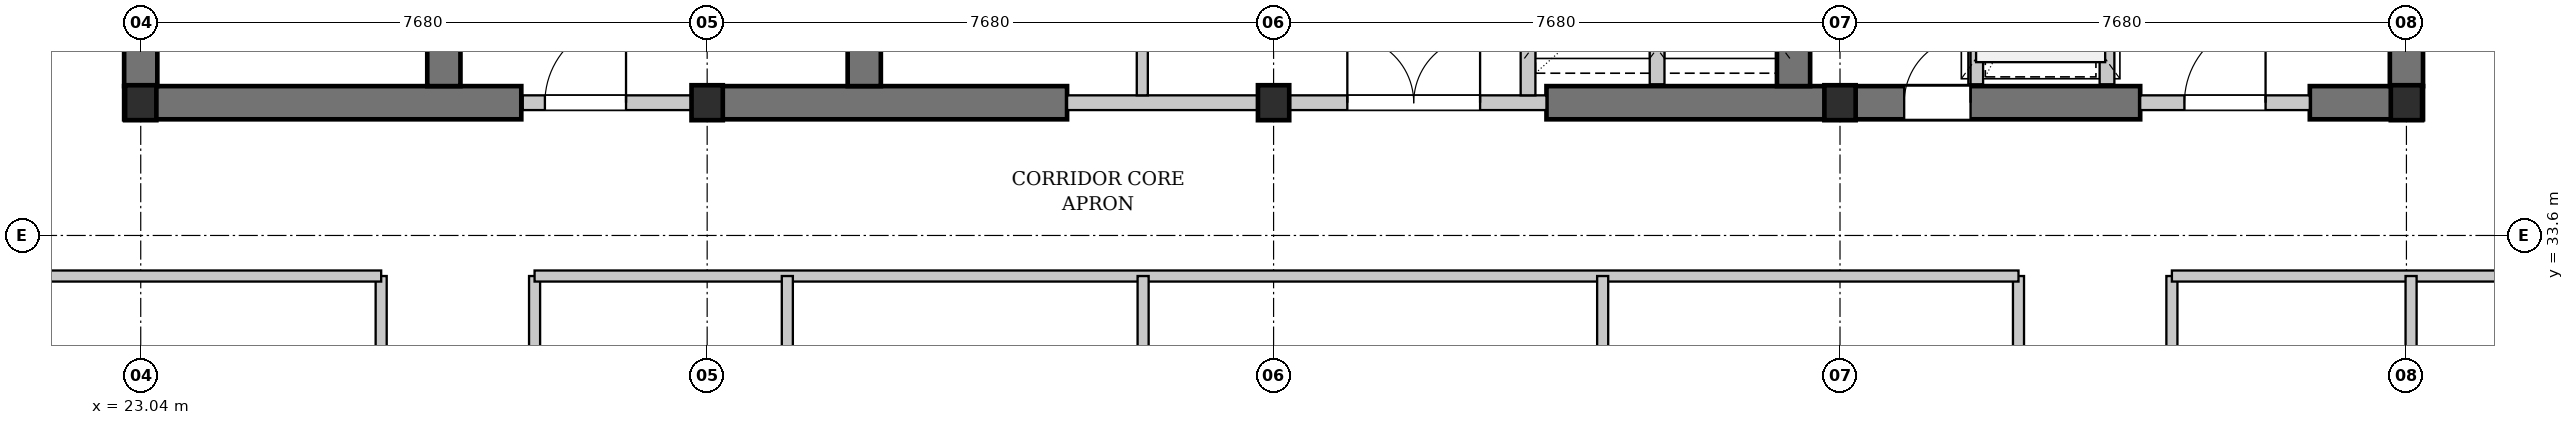
"""IFC4 building model, lengths in metres.
Left out: names, types, materials, properties, quantities, classifications, styles, units other than length and angle.
Written with IfcOpenShell. Run it as: python <this file> out.ifc"""

import sys

from ifc_helpers import new_model, si_unit, direction, frame, frame_2d, origin, origin_2d, place, context, subcontext, project, spatial, rectangle, i_section, extrude, element, fill, save


model = new_model("IFC4")
c1 = context("Model", 3, precision=1e-05, world=origin(), true_north=direction((0.0, 1.0)))
c2 = subcontext(c1, "Body", "Model", "MODEL_VIEW")
j1 = project(units=[si_unit("LENGTHUNIT", "METRE"), si_unit("PLANEANGLEUNIT", "RADIAN")], contexts=[c1])
p1 = place(None, origin())
s1 = spatial("IfcSite", under=j1, at=p1, CompositionType="ELEMENT")
p2 = place(p1, origin())
s2 = spatial("IfcBuilding", under=s1, at=p2, CompositionType="ELEMENT")
p3 = place(p2, frame((0.0, 0.0, 106.7)))
s3 = spatial("IfcBuildingStorey", under=s2, at=p3, CompositionType="ELEMENT", Elevation=106.7)
p4 = place(p3, frame((22.815, 35.4, 0.0), z_axis=(0.0, 0.0, 1.0), x_axis=(1.0, 0.0, 0.0)))
e1 = element("IfcWall", 1, at=p4, inside=s3, PredefinedType="SHEAR", context=c2, shape_type="SweptSolid", body=[
    extrude(rectangle(XDim=5.385, YDim=0.45, at=frame_2d((2.692, 0.0))), origin(), (0.0, 0.0, 1.0), 3.18),
])
p5 = place(p3, frame((30.72, 35.4, 0.0), z_axis=(0.0, 0.0, 1.0), x_axis=(1.0, 0.0, 0.0)))
e2 = element("IfcWall", 2, at=p5, inside=s3, PredefinedType="SHEAR", context=c2, shape_type="SweptSolid", body=[
    extrude(rectangle(XDim=4.88, YDim=0.45, at=frame_2d((2.44, 0.0))), origin(), (0.0, 0.0, 1.0), 3.18),
])
p6 = place(p3, frame((42.1, 35.4, 0.0), z_axis=(0.0, 0.0, 1.0), x_axis=(1.0, 0.0, 0.0)))
e3 = element("IfcWall", 3, at=p6, inside=s3, PredefinedType="SHEAR", context=c2, shape_type="SweptSolid", body=[
    extrude(rectangle(XDim=8.05, YDim=0.45, at=frame_2d((4.025, 0.0))), origin(), (0.0, 0.0, 1.0), 3.18),
])
p7 = place(p6, frame((4.85, 0.0, 0.0)))
e4 = element("IfcOpeningElement", 4, at=p7, cuts=e3, PredefinedType="OPENING", context=c2, shape_type="SweptSolid", body=[
    extrude(rectangle(XDim=0.9, YDim=2.15, at=frame_2d((0.45, 1.075))), frame((0.0, 0.235, 0.0), z_axis=(0.0, -1.0, 0.0), x_axis=(1.0, 0.0, 0.0)), (0.0, 0.0, 1.0), 0.47),
])
p8 = place(p3, frame((52.45, 35.4, 0.0), z_axis=(0.0, 0.0, 1.0), x_axis=(1.0, 0.0, 0.0)))
e5 = element("IfcWall", 5, at=p8, inside=s3, PredefinedType="SHEAR", context=c2, shape_type="SweptSolid", body=[
    extrude(rectangle(XDim=1.535, YDim=0.45, at=frame_2d((0.768, 0.0))), origin(), (0.0, 0.0, 1.0), 3.18),
])
p9 = place(p3, frame((23.04, 35.625, 0.0), z_axis=(0.0, 0.0, 1.0), x_axis=(0.0, 1.0, 0.0)))
e6 = element("IfcWall", 6, at=p9, inside=s3, PredefinedType="SHEAR", context=c2, shape_type="SweptSolid", body=[
    extrude(rectangle(XDim=10.35, YDim=0.45, at=frame_2d((5.175, 0.0))), origin(), (0.0, 0.0, 1.0), 3.18),
])
p10 = place(p3, frame((27.15, 35.625, 0.0), z_axis=(0.0, 0.0, 1.0), x_axis=(0.0, 1.0, 0.0)))
e7 = element("IfcWall", 7, at=p10, inside=s3, PredefinedType="SHEAR", context=c2, shape_type="SweptSolid", body=[
    extrude(rectangle(XDim=10.35, YDim=0.45, at=frame_2d((5.175, 0.0))), origin(), (0.0, 0.0, 1.0), 3.18),
])
p11 = place(p10, frame((0.675, 0.0, 0.0)))
e8 = element("IfcOpeningElement", 8, at=p11, cuts=e7, PredefinedType="OPENING", context=c2, shape_type="SweptSolid", body=[
    extrude(rectangle(XDim=1.1, YDim=2.15, at=frame_2d((0.55, 1.075))), frame((0.0, 0.235, 0.0), z_axis=(0.0, -1.0, 0.0), x_axis=(1.0, 0.0, 0.0)), (0.0, 0.0, 1.0), 0.47),
])
for number, where, z_axis, x_axis in (
    (9, (32.85, 35.625, 0.0), (0.0, 0.0, 1.0), (0.0, 1.0, 0.0)),
    (10, (45.45, 35.625, 0.0), (0.0, 0.0, 1.0), (0.0, 1.0, 0.0)),
    (11, (53.76, 35.625, 0.0), (0.0, 0.0, 1.0), (0.0, 1.0, 0.0)),
):
    element("IfcWall", number, at=place(p3, frame(where, z_axis=z_axis, x_axis=x_axis)), inside=s3, PredefinedType="SHEAR", context=c2, shape_type="SweptSolid", body=[
        extrude(rectangle(XDim=10.35, YDim=0.45, at=frame_2d((5.175, 0.0))), origin(), (0.0, 0.0, 1.0), 3.18),
    ])
for number, where, z_axis, x_axis in (
    (12, (23.04, 35.4, 0.0), (0.0, 0.0, 1.0), (1.0, 0.0, 0.0)),
    (13, (30.72, 35.4, 0.0), (0.0, 0.0, 1.0), (1.0, 0.0, 0.0)),
    (14, (38.4, 35.4, 0.0), (0.0, 0.0, 1.0), (1.0, 0.0, 0.0)),
    (15, (46.08, 35.4, 0.0), (0.0, 0.0, 1.0), (1.0, 0.0, 0.0)),
    (16, (53.76, 35.4, 0.0), (0.0, 0.0, 1.0), (1.0, 0.0, 0.0)),
):
    element("IfcColumn", number, at=place(p3, frame(where, z_axis=z_axis, x_axis=x_axis)), inside=s3, PredefinedType="COLUMN", context=c2, shape_type="SweptSolid", body=[
        extrude(i_section(OverallWidth=0.424, OverallDepth=0.474, WebThickness=0.047, FlangeThickness=0.077, FilletRadius=0.015, at=origin_2d()), origin(), (0.0, 0.0, 1.0), 3.4),
    ])
p12 = place(p3, frame((28.22, 35.4, 0.0), z_axis=(0.0, 0.0, 1.0), x_axis=(1.0, 0.0, 0.0)))
e17 = element("IfcWall", 17, at=p12, inside=s3, PredefinedType="PARTITIONING", context=c2, shape_type="SweptSolid", body=[
    extrude(rectangle(XDim=2.5, YDim=0.2, at=frame_2d((1.25, 0.0))), origin(), (0.0, 0.0, 1.0), 2.525),
])
p13 = place(p12, frame((0.3, 0.0, 0.0)))
e18 = element("IfcOpeningElement", 18, at=p13, cuts=e17, PredefinedType="OPENING", context=c2, shape_type="SweptSolid", body=[
    extrude(rectangle(XDim=1.1, YDim=2.15, at=frame_2d((0.55, 1.075))), frame((0.0, 0.11, 0.0), z_axis=(0.0, -1.0, 0.0), x_axis=(1.0, 0.0, 0.0)), (0.0, 0.0, 1.0), 0.22),
])
p14 = place(p3, frame((35.6, 35.4, 0.0), z_axis=(0.0, 0.0, 1.0), x_axis=(1.0, 0.0, 0.0)))
e19 = element("IfcWall", 19, at=p14, inside=s3, PredefinedType="PARTITIONING", context=c2, shape_type="SweptSolid", body=[
    extrude(rectangle(XDim=6.5, YDim=0.2, at=frame_2d((3.25, 0.0))), origin(), (0.0, 0.0, 1.0), 2.525),
])
p15 = place(p14, frame((3.8, 0.0, 0.0)))
e20 = element("IfcOpeningElement", 20, at=p15, cuts=e19, PredefinedType="OPENING", context=c2, shape_type="SweptSolid", body=[
    extrude(rectangle(XDim=1.8, YDim=2.3, at=frame_2d((0.9, 1.15))), frame((0.0, 0.11, 0.0), z_axis=(0.0, -1.0, 0.0), x_axis=(1.0, 0.0, 0.0)), (0.0, 0.0, 1.0), 0.22),
])
p16 = place(p3, frame((36.62, 35.5, 0.0), z_axis=(0.0, 0.0, 1.0), x_axis=(0.0, 1.0, 0.0)))
e21 = element("IfcWall", 21, at=p16, inside=s3, PredefinedType="PARTITIONING", context=c2, shape_type="SweptSolid", body=[
    extrude(rectangle(XDim=10.42, YDim=0.15, at=frame_2d((5.21, 0.0))), origin(), (0.0, 0.0, 1.0), 3.18),
])
p17 = place(p16, frame((3.92, 0.0, 0.0)))
e22 = element("IfcOpeningElement", 22, at=p17, cuts=e21, PredefinedType="OPENING", context=c2, shape_type="SweptSolid", body=[
    extrude(rectangle(XDim=0.9, YDim=2.15, at=frame_2d((0.45, 1.075))), frame((0.0, 0.085, 0.0), z_axis=(0.0, -1.0, 0.0), x_axis=(1.0, 0.0, 0.0)), (0.0, 0.0, 1.0), 0.17),
])
p18 = place(p16, frame((5.85, 0.0, 0.0)))
e23 = element("IfcOpeningElement", 23, at=p18, cuts=e21, PredefinedType="OPENING", context=c2, shape_type="SweptSolid", body=[
    extrude(rectangle(XDim=0.9, YDim=2.15, at=frame_2d((0.45, 1.075))), frame((0.0, 0.085, 0.0), z_axis=(0.0, -1.0, 0.0), x_axis=(1.0, 0.0, 0.0)), (0.0, 0.0, 1.0), 0.17),
])
p19 = place(p3, frame((43.6, 35.65, 0.0), z_axis=(0.0, 0.0, 1.0), x_axis=(0.0, 1.0, 0.0)))
e24 = element("IfcWall", 24, at=p19, inside=s3, PredefinedType="PARTITIONING", context=c2, shape_type="SweptSolid", body=[
    extrude(rectangle(XDim=3.25, YDim=0.2, at=frame_2d((1.625, 0.0))), origin(), (0.0, 0.0, 1.0), 3.18),
])
p20 = place(p3, frame((41.85, 35.5, 0.0), z_axis=(0.0, 0.0, 1.0), x_axis=(0.0, 1.0, 0.0)))
e25 = element("IfcWall", 25, at=p20, inside=s3, PredefinedType="PARTITIONING", context=c2, shape_type="SweptSolid", body=[
    extrude(rectangle(XDim=3.4, YDim=0.2, at=frame_2d((1.7, 0.0))), origin(), (0.0, 0.0, 1.0), 3.18),
])
p21 = place(p3, frame((50.15, 35.4, 0.0), z_axis=(0.0, 0.0, 1.0), x_axis=(1.0, 0.0, 0.0)))
e26 = element("IfcWall", 26, at=p21, inside=s3, PredefinedType="PARTITIONING", context=c2, shape_type="SweptSolid", body=[
    extrude(rectangle(XDim=2.3, YDim=0.2, at=frame_2d((1.15, 0.0))), origin(), (0.0, 0.0, 1.0), 2.525),
])
p22 = place(p21, frame((0.6, 0.0, 0.0)))
e27 = element("IfcOpeningElement", 27, at=p22, cuts=e26, PredefinedType="OPENING", context=c2, shape_type="SweptSolid", body=[
    extrude(rectangle(XDim=1.1, YDim=2.15, at=frame_2d((0.55, 1.075))), frame((0.0, 0.11, 0.0), z_axis=(0.0, -1.0, 0.0), x_axis=(1.0, 0.0, 0.0)), (0.0, 0.0, 1.0), 0.22),
])
p23 = place(p3, frame((49.7, 35.65, 0.0), z_axis=(0.0, 0.0, 1.0), x_axis=(0.0, 1.0, 0.0)))
e28 = element("IfcWall", 28, at=p23, inside=s3, PredefinedType="PARTITIONING", context=c2, shape_type="SweptSolid", body=[
    extrude(rectangle(XDim=3.15, YDim=0.2, at=frame_2d((1.575, 0.0))), origin(), (0.0, 0.0, 1.0), 3.18),
])
p24 = place(p23, frame((0.85, 0.0, 0.0)))
e29 = element("IfcOpeningElement", 29, at=p24, cuts=e28, PredefinedType="OPENING", context=c2, shape_type="SweptSolid", body=[
    extrude(rectangle(XDim=1.2, YDim=2.2, at=frame_2d((0.6, 1.1))), frame((0.0, 0.11, 0.0), z_axis=(0.0, -1.0, 0.0), x_axis=(1.0, 0.0, 0.0)), (0.0, 0.0, 1.0), 0.22),
])
p25 = place(p3, frame((47.92, 35.65, 0.0), z_axis=(0.0, 0.0, 1.0), x_axis=(0.0, 1.0, 0.0)))
e30 = element("IfcWall", 30, at=p25, inside=s3, PredefinedType="PARTITIONING", context=c2, shape_type="SweptSolid", body=[
    extrude(rectangle(XDim=3.15, YDim=0.2, at=frame_2d((1.575, 0.0))), origin(), (0.0, 0.0, 1.0), 3.18),
])
for number, where, z_axis, x_axis in (
    (31, (26.3, 28.83, 0.0), (0.0, 0.0, 1.0), (0.0, 1.0, 0.0)),
    (32, (28.38, 28.83, 0.0), (0.0, 0.0, 1.0), (0.0, 1.0, 0.0)),
    (33, (48.5, 28.83, 0.0), (0.0, 0.0, 1.0), (0.0, 1.0, 0.0)),
    (34, (50.58, 28.83, 0.0), (0.0, 0.0, 1.0), (0.0, 1.0, 0.0)),
):
    element("IfcWall", number, at=place(p3, frame(where, z_axis=z_axis, x_axis=x_axis)), inside=s3, PredefinedType="PARTITIONING", context=c2, shape_type="SweptSolid", body=[
        extrude(rectangle(XDim=4.22, YDim=0.15, at=frame_2d((2.11, 0.0))), origin(), (0.0, 0.0, 1.0), 3.18),
    ])
p26 = place(p3, frame((20.008, 33.05, 0.0), z_axis=(0.0, 0.0, 1.0), x_axis=(1.0, 0.0, 0.0)))
e35 = element("IfcWall", 35, at=p26, inside=s3, PredefinedType="PARTITIONING", context=c2, shape_type="SweptSolid", body=[
    extrude(rectangle(XDim=6.292, YDim=0.15, at=frame_2d((3.146, 0.0))), origin(), (0.0, 0.0, 1.0), 3.18),
])
p27 = place(p3, frame((28.38, 33.05, 0.0), z_axis=(0.0, 0.0, 1.0), x_axis=(1.0, 0.0, 0.0)))
e36 = element("IfcWall", 36, at=p27, inside=s3, PredefinedType="PARTITIONING", context=c2, shape_type="SweptSolid", body=[
    extrude(rectangle(XDim=20.12, YDim=0.15, at=frame_2d((10.06, 0.0))), origin(), (0.0, 0.0, 1.0), 3.18),
])
p28 = place(p3, frame((50.58, 33.05, 0.0), z_axis=(0.0, 0.0, 1.0), x_axis=(1.0, 0.0, 0.0)))
e37 = element("IfcWall", 37, at=p28, inside=s3, PredefinedType="PARTITIONING", context=c2, shape_type="SweptSolid", body=[
    extrude(rectangle(XDim=19.049, YDim=0.15, at=frame_2d((9.524, 0.0))), origin(), (0.0, 0.0, 1.0), 2.525),
])
for number, where, z_axis, x_axis in (
    (38, (31.807, 28.83, 0.0), (0.0, 0.0, 1.0), (0.0, 1.0, 0.0)),
    (39, (36.631, 28.83, 0.0), (0.0, 0.0, 1.0), (0.0, 1.0, 0.0)),
    (40, (42.862, 28.83, 0.0), (0.0, 0.0, 1.0), (0.0, 1.0, 0.0)),
):
    element("IfcWall", number, at=place(p3, frame(where, z_axis=z_axis, x_axis=x_axis)), inside=s3, PredefinedType="PARTITIONING", context=c2, shape_type="SweptSolid", body=[
        extrude(rectangle(XDim=4.22, YDim=0.15, at=frame_2d((2.11, 0.0))), origin(), (0.0, 0.0, 1.0), 3.18),
    ])
p29 = place(p3, frame((53.823, 28.83, 0.0), z_axis=(0.0, 0.0, 1.0), x_axis=(0.0, 1.0, 0.0)))
e41 = element("IfcWall", 41, at=p29, inside=s3, PredefinedType="PARTITIONING", context=c2, shape_type="SweptSolid", body=[
    extrude(rectangle(XDim=4.22, YDim=0.15, at=frame_2d((2.11, 0.0))), origin(), (0.0, 0.0, 1.0), 2.525),
])
p30 = place(p13, origin())
e42 = element("IfcDoor", 42, at=p30, inside=s3, OperationType="SINGLE_SWING_RIGHT", PredefinedType="DOOR", context=c2, shape_type="SweptSolid", body=[
    extrude(rectangle(XDim=1.1, YDim=2.15, at=frame_2d((0.55, 1.075))), frame((0.0, 0.025, 0.0), z_axis=(0.0, -1.0, 0.0), x_axis=(1.0, 0.0, 0.0)), (0.0, 0.0, 1.0), 0.05),
])
fill(e18, e42)
p31 = place(p15, origin())
e43 = element("IfcDoor", 43, at=p31, inside=s3, OperationType="DOUBLE_DOOR_SINGLE_SWING", PredefinedType="DOOR", context=c2, shape_type="SweptSolid", body=[
    extrude(rectangle(XDim=1.8, YDim=2.3, at=frame_2d((0.9, 1.15))), frame((0.0, 0.025, 0.0), z_axis=(0.0, -1.0, 0.0), x_axis=(1.0, 0.0, 0.0)), (0.0, 0.0, 1.0), 0.05),
])
fill(e20, e43)
p32 = place(p22, origin())
e44 = element("IfcDoor", 44, at=p32, inside=s3, OperationType="SINGLE_SWING_RIGHT", PredefinedType="DOOR", context=c2, shape_type="SweptSolid", body=[
    extrude(rectangle(XDim=1.1, YDim=2.15, at=frame_2d((0.55, 1.075))), frame((0.0, 0.025, 0.0), z_axis=(0.0, -1.0, 0.0), x_axis=(1.0, 0.0, 0.0)), (0.0, 0.0, 1.0), 0.05),
])
fill(e27, e44)
p33 = place(p7, origin())
e45 = element("IfcDoor", 45, at=p33, inside=s3, OperationType="SINGLE_SWING_RIGHT", PredefinedType="DOOR", context=c2, shape_type="SweptSolid", body=[
    extrude(rectangle(XDim=0.9, YDim=2.15, at=frame_2d((0.45, 1.075))), frame((0.0, 0.025, 0.0), z_axis=(0.0, -1.0, 0.0), x_axis=(1.0, 0.0, 0.0)), (0.0, 0.0, 1.0), 0.05),
])
fill(e4, e45)
save(model, sys.argv[1])
